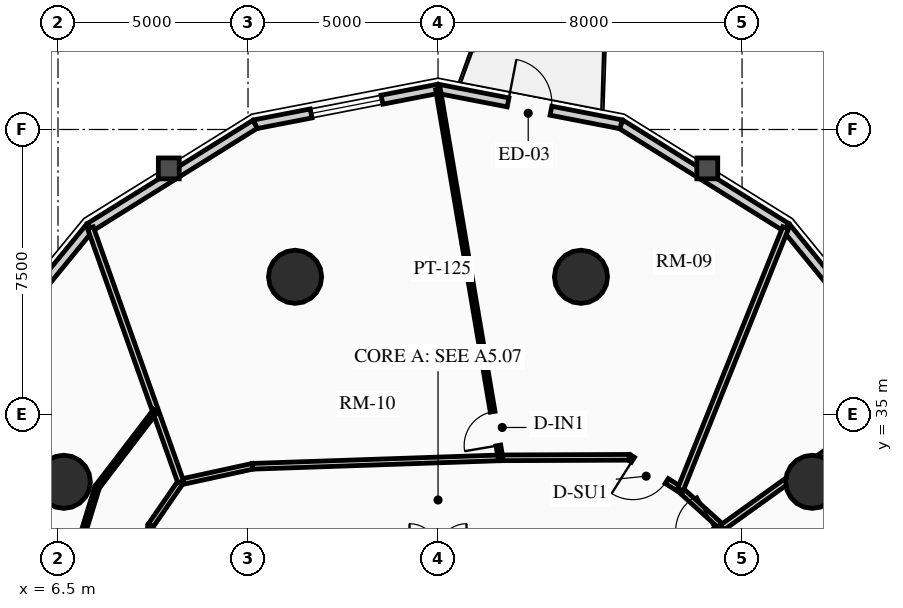
"""IFC4 building model, lengths in metres.
Left out: names, types, materials, properties, quantities, classifications, styles, units other than length and angle.
Written with IfcOpenShell. Run it as: python <this file> out.ifc"""

import sys

from ifc_helpers import new_model, si_unit, direction, frame, frame_2d, origin, origin_2d, place, context, subcontext, project, spatial, rectangle, circle, extrude, source, transform, mapped, element, fill, save


model = new_model("IFC4")
c1 = context("Model", 3, precision=1e-05, world=origin(), true_north=direction((0.0, 1.0)))
c2 = subcontext(c1, "Body", "Model", "MODEL_VIEW")
j1 = project(units=[si_unit("LENGTHUNIT", "METRE"), si_unit("PLANEANGLEUNIT", "RADIAN")], contexts=[c1])
p1 = place(None, origin())
s1 = spatial("IfcSite", under=j1, at=p1, CompositionType="ELEMENT")
p2 = place(p1, origin())
s2 = spatial("IfcBuilding", under=s1, at=p2, CompositionType="ELEMENT")
p3 = place(p2, frame((0.0, 0.0, 113.8)))
s3 = spatial("IfcBuildingStorey", under=s2, at=p3, CompositionType="ELEMENT", Elevation=113.8)
for number, where, z_axis, x_axis in (
    (1, (26.347, 33.229, 0.0), (0.0, 0.0, 1.0), (1.0, 0.0, 0.0)),
    (2, (20.261, 38.623, 0.0), (0.0, 0.0, 1.0), (1.0, 0.0, 0.0)),
    (3, (12.739, 38.623, 0.0), (0.0, 0.0, 1.0), (1.0, 0.0, 0.0)),
    (4, (6.653, 33.229, 0.0), (0.0, 0.0, 1.0), (1.0, 0.0, 0.0)),
):
    element("IfcColumn", number, at=place(p3, frame(where, z_axis=z_axis, x_axis=x_axis)), inside=s3, PredefinedType="USERDEFINED", context=c2, shape_type="SweptSolid", body=[
        extrude(circle(Radius=0.7, at=origin_2d()), origin(), (0.0, 0.0, 1.0), 2.91),
    ])
p4 = place(p3, frame((25.658, 39.928, 0.0), z_axis=(0.0, 0.0, 1.0), x_axis=(0.632700781152, -0.77439635945, 0.0)))
e5 = element("IfcWall", 5, at=p4, inside=s3, PredefinedType="SOLIDWALL", context=c2, shape_type="SweptSolid", body=[
    extrude(rectangle(XDim=5.448, YDim=0.24, at=frame_2d((2.724, 0.0))), origin(), (0.0, 0.0, 1.0), 2.179),
])
m1 = source(origin(), c2, "Body", "SweptSolid", [
    extrude(rectangle(XDim=1.9, YDim=1.35, at=frame_2d((0.95, 0.675))), frame((0.0, 0.13, 0.0), z_axis=(0.0, -1.0, 0.0), x_axis=(1.0, 0.0, 0.0)), (0.0, 0.0, 1.0), 0.26),
])
p5 = place(p4, frame((1.774, 0.0, 0.65)))
e6 = element("IfcOpeningElement", 6, at=p5, cuts=e5, PredefinedType="OPENING", context=c2, shape_type="MappedRepresentation", body=[
    mapped(m1, transform((0.0, 0.0, 0.0), x_axis=(1.0, 0.0, 0.0), y_axis=(0.0, 1.0, 0.0), z_axis=(0.0, 0.0, 1.0), scale=1.0)),
])
p6 = place(p3, frame((21.315, 42.637, 0.0), z_axis=(0.0, 0.0, 1.0), x_axis=(0.848520380187, -0.529162701263, 0.0)))
e7 = element("IfcWall", 7, at=p6, inside=s3, PredefinedType="SOLIDWALL", context=c2, shape_type="SweptSolid", body=[
    extrude(rectangle(XDim=5.119, YDim=0.24, at=frame_2d((2.56, 0.0))), origin(), (0.0, 0.0, 1.0), 2.179),
])
p7 = place(p3, frame((16.5, 43.57, 0.0), z_axis=(0.0, 0.0, 1.0), x_axis=(0.981723785992, -0.190311344954, 0.0)))
e8 = element("IfcWall", 8, at=p7, inside=s3, PredefinedType="SOLIDWALL", context=c2, shape_type="SweptSolid", body=[
    extrude(rectangle(XDim=4.904, YDim=0.24, at=frame_2d((2.452, 0.0))), origin(), (0.0, 0.0, 1.0), 2.179),
])
m2 = source(origin(), c2, "Body", "SweptSolid", [
    extrude(rectangle(XDim=1.15, YDim=2.005, at=frame_2d((0.575, 1.002))), frame((0.0, 0.13, 0.0), z_axis=(0.0, -1.0, 0.0), x_axis=(1.0, 0.0, 0.0)), (0.0, 0.0, 1.0), 0.26),
])
p8 = place(p7, frame((1.877, 0.0, 0.0)))
e9 = element("IfcOpeningElement", 9, at=p8, cuts=e8, PredefinedType="OPENING", context=c2, shape_type="MappedRepresentation", body=[
    mapped(m2, transform((0.0, 0.0, 0.0), x_axis=(1.0, 0.0, 0.0), y_axis=(0.0, 1.0, 0.0), z_axis=(0.0, 0.0, 1.0), scale=1.0)),
])
p9 = place(p3, frame((11.685, 42.637, 0.0), z_axis=(0.0, 0.0, 1.0), x_axis=(0.981723785992, 0.190311344954, 0.0)))
e10 = element("IfcWall", 10, at=p9, inside=s3, PredefinedType="SOLIDWALL", context=c2, shape_type="SweptSolid", body=[
    extrude(rectangle(XDim=4.904, YDim=0.24, at=frame_2d((2.452, 0.0))), origin(), (0.0, 0.0, 1.0), 2.179),
])
p10 = place(p9, frame((1.502, 0.0, 0.65)))
e11 = element("IfcOpeningElement", 11, at=p10, cuts=e10, PredefinedType="OPENING", context=c2, shape_type="MappedRepresentation", body=[
    mapped(m1, transform((0.0, 0.0, 0.0), x_axis=(1.0, 0.0, 0.0), y_axis=(0.0, 1.0, 0.0), z_axis=(0.0, 0.0, 1.0), scale=1.0)),
])
p11 = place(p3, frame((7.342, 39.928, 0.0), z_axis=(0.0, 0.0, 1.0), x_axis=(0.848520380187, 0.529162701263, 0.0)))
e12 = element("IfcWall", 12, at=p11, inside=s3, PredefinedType="SOLIDWALL", context=c2, shape_type="SweptSolid", body=[
    extrude(rectangle(XDim=5.119, YDim=0.24, at=frame_2d((2.56, 0.0))), origin(), (0.0, 0.0, 1.0), 2.179),
])
p12 = place(p3, frame((3.895, 35.709, 0.0), z_axis=(0.0, 0.0, 1.0), x_axis=(0.632700781152, 0.77439635945, 0.0)))
e13 = element("IfcWall", 13, at=p12, inside=s3, PredefinedType="SOLIDWALL", context=c2, shape_type="SweptSolid", body=[
    extrude(rectangle(XDim=5.448, YDim=0.24, at=frame_2d((2.724, 0.0))), origin(), (0.0, 0.0, 1.0), 2.179),
])
p13 = place(p12, frame((1.774, 0.0, 0.65)))
e14 = element("IfcOpeningElement", 14, at=p13, cuts=e13, PredefinedType="OPENING", context=c2, shape_type="MappedRepresentation", body=[
    mapped(m1, transform((0.0, 0.0, 0.0), x_axis=(1.0, 0.0, 0.0), y_axis=(0.0, 1.0, 0.0), z_axis=(0.0, 0.0, 1.0), scale=1.0)),
])
p14 = place(p3, frame((23.98, 32.027, 0.0), z_axis=(0.0, 0.0, 1.0), x_axis=(-0.742353224332, 0.670008724065, 0.0)))
e15 = element("IfcWall", 15, at=p14, inside=s3, PredefinedType="PARTITIONING", context=c2, shape_type="SweptSolid", body=[
    extrude(rectangle(XDim=1.485, YDim=0.15, at=frame_2d((0.742, 0.0))), origin(), (0.0, 0.0, 1.0), 2.225),
])
p15 = place(p3, frame((22.877, 33.022, 0.0), z_axis=(0.0, 0.0, 1.0), x_axis=(-0.845895608855, 0.533348496689, 0.0)))
e16 = element("IfcWall", 16, at=p15, inside=s3, PredefinedType="PARTITIONING", context=c2, shape_type="SweptSolid", body=[
    extrude(rectangle(XDim=1.597, YDim=0.15, at=frame_2d((0.798, 0.0))), origin(), (0.0, 0.0, 1.0), 2.225),
])
m3 = source(origin(), c2, "Body", "SweptSolid", [
    extrude(rectangle(XDim=1.05, YDim=2.015, at=frame_2d((0.525, 1.007))), frame((0.0, 0.085, 0.0), z_axis=(0.0, -1.0, 0.0), x_axis=(1.0, 0.0, 0.0)), (0.0, 0.0, 1.0), 0.17),
])
p16 = place(p15, frame((0.427, 0.0, 0.0)))
e17 = element("IfcOpeningElement", 17, at=p16, cuts=e16, PredefinedType="OPENING", context=c2, shape_type="MappedRepresentation", body=[
    mapped(m3, transform((0.0, 0.0, 0.0), x_axis=(1.0, 0.0, 0.0), y_axis=(0.0, 1.0, 0.0), z_axis=(0.0, 0.0, 1.0), scale=1.0)),
])
p17 = place(p3, frame((21.527, 33.873, 0.0), z_axis=(0.0, 0.0, 1.0), x_axis=(-0.999991838845, -0.004040079574, 0.0)))
e18 = element("IfcWall", 18, at=p17, inside=s3, PredefinedType="PARTITIONING", context=c2, shape_type="SweptSolid", body=[
    extrude(rectangle(XDim=3.384, YDim=0.15, at=frame_2d((1.692, 0.0))), origin(), (0.0, 0.0, 1.0), 2.225),
])
p18 = place(p3, frame((18.143, 33.86, 0.0), z_axis=(0.0, 0.0, 1.0), x_axis=(-0.999419208319, -0.034077060363, 0.0)))
e19 = element("IfcWall", 19, at=p18, inside=s3, PredefinedType="PARTITIONING", context=c2, shape_type="SweptSolid", body=[
    extrude(rectangle(XDim=6.527, YDim=0.15, at=frame_2d((3.263, 0.0))), origin(), (0.0, 0.0, 1.0), 2.225),
])
p19 = place(p3, frame((11.62, 33.637, 0.0), z_axis=(0.0, 0.0, 1.0), x_axis=(-0.97702579435, -0.213121085711, 0.0)))
e20 = element("IfcWall", 20, at=p19, inside=s3, PredefinedType="PARTITIONING", context=c2, shape_type="SweptSolid", body=[
    extrude(rectangle(XDim=1.935, YDim=0.15, at=frame_2d((0.967, 0.0))), origin(), (0.0, 0.0, 1.0), 2.225),
])
p20 = place(p3, frame((9.729, 33.225, 0.0), z_axis=(0.0, 0.0, 1.0), x_axis=(-0.567183649484, -0.82359134755, 0.0)))
e21 = element("IfcWall", 21, at=p20, inside=s3, PredefinedType="PARTITIONING", context=c2, shape_type="SweptSolid", body=[
    extrude(rectangle(XDim=1.392, YDim=0.15, at=frame_2d((0.696, 0.0))), origin(), (0.0, 0.0, 1.0), 2.225),
])
p21 = place(p3, frame((8.94, 32.078, 0.0), z_axis=(0.0, 0.0, 1.0), x_axis=(-0.159148467753, -0.98725466077, 0.0)))
e22 = element("IfcWall", 22, at=p21, inside=s3, PredefinedType="PARTITIONING", context=c2, shape_type="SweptSolid", body=[
    extrude(rectangle(XDim=1.554, YDim=0.15, at=frame_2d((0.777, 0.0))), origin(), (0.0, 0.0, 1.0), 2.225),
])
p22 = place(p3, frame((23.98, 32.027, 0.0), z_axis=(0.0, 0.0, 1.0), x_axis=(0.812162479031, 0.58343132214, 0.0)))
e23 = element("IfcWall", 23, at=p22, inside=s3, PredefinedType="PARTITIONING", context=c2, shape_type="SweptSolid", body=[
    extrude(rectangle(XDim=6.291, YDim=0.16, at=frame_2d((3.146, 0.0))), origin(), (0.0, 0.0, 1.0), 2.179),
])
p23 = place(p3, frame((22.877, 33.022, 0.0), z_axis=(0.0, 0.0, 1.0), x_axis=(0.372898022516, 0.927872332168, 0.0)))
e24 = element("IfcWall", 24, at=p23, inside=s3, PredefinedType="PARTITIONING", context=c2, shape_type="SweptSolid", body=[
    extrude(rectangle(XDim=7.426, YDim=0.16, at=frame_2d((3.713, 0.0))), origin(), (0.0, 0.0, 1.0), 2.179),
])
p24 = place(p3, frame((9.729, 33.225, 0.0), z_axis=(0.0, 0.0, 1.0), x_axis=(-0.334806049563, 0.942287063042, 0.0)))
e25 = element("IfcWall", 25, at=p24, inside=s3, PredefinedType="PARTITIONING", context=c2, shape_type="SweptSolid", body=[
    extrude(rectangle(XDim=7.097, YDim=0.16, at=frame_2d((3.548, 0.0))), origin(), (0.0, 0.0, 1.0), 2.179),
])
p25 = place(p3, frame((22.075, 31.025, 0.0), z_axis=(0.0, 0.0, 1.0), x_axis=(0.885026466958, 0.465540710125, 0.0)))
e26 = element("IfcWall", 26, at=p25, inside=s3, PredefinedType="PARTITIONING", context=c2, shape_type="SweptSolid", body=[
    extrude(rectangle(XDim=2.152, YDim=0.16, at=frame_2d((1.076, 0.0))), origin(), (0.0, 0.0, 1.0), 2.225),
])
m4 = source(origin(), c2, "Body", "SweptSolid", [
    extrude(rectangle(XDim=1.05, YDim=2.015, at=frame_2d((0.525, 1.007))), frame((0.0, 0.09, 0.0), z_axis=(0.0, -1.0, 0.0), x_axis=(1.0, 0.0, 0.0)), (0.0, 0.0, 1.0), 0.18),
])
p26 = place(p25, frame((0.902, 0.0, 0.0)))
e27 = element("IfcOpeningElement", 27, at=p26, cuts=e26, PredefinedType="OPENING", context=c2, shape_type="MappedRepresentation", body=[
    mapped(m4, transform((0.0, 0.0, 0.0), x_axis=(1.0, 0.0, 0.0), y_axis=(0.0, 1.0, 0.0), z_axis=(0.0, 0.0, 1.0), scale=1.0)),
])
p27 = place(p3, frame((18.143, 33.86, 0.0), z_axis=(0.0, 0.0, 1.0), x_axis=(-0.167145472003, 0.985932244725, 0.0)))
e28 = element("IfcWall", 28, at=p27, inside=s3, PredefinedType="PARTITIONING", context=c2, shape_type="SweptSolid", body=[
    extrude(rectangle(XDim=9.829, YDim=0.125, at=frame_2d((4.914, 0.0))), origin(), (0.0, 0.0, 1.0), 2.179),
])
m5 = source(origin(), c2, "Body", "SweptSolid", [
    extrude(rectangle(XDim=0.9, YDim=2.005, at=frame_2d((0.45, 1.002))), frame((0.0, 0.073, 0.0), z_axis=(0.0, -1.0, 0.0), x_axis=(1.0, 0.0, 0.0)), (0.0, 0.0, 1.0), 0.145),
])
p28 = place(p27, frame((0.33, 0.0, 0.0)))
e29 = element("IfcOpeningElement", 29, at=p28, cuts=e28, PredefinedType="OPENING", context=c2, shape_type="MappedRepresentation", body=[
    mapped(m5, transform((0.0, 0.0, 0.0), x_axis=(1.0, 0.0, 0.0), y_axis=(0.0, 1.0, 0.0), z_axis=(0.0, 0.0, 1.0), scale=1.0)),
])
p29 = place(p3, frame((9.064, 35.097, 0.0), z_axis=(0.0, 0.0, 1.0), x_axis=(-0.607126893664, -0.794604892377, 0.0)))
e30 = element("IfcWall", 30, at=p29, inside=s3, PredefinedType="PARTITIONING", context=c2, shape_type="SweptSolid", body=[
    extrude(rectangle(XDim=2.524, YDim=0.125, at=frame_2d((1.262, 0.0))), origin(), (0.0, 0.0, 1.0), 2.179),
])
p30 = place(p3, frame((7.532, 33.092, 0.0), z_axis=(0.0, 0.0, 1.0), x_axis=(-0.293965637063, -0.955815988685, 0.0)))
e31 = element("IfcWall", 31, at=p30, inside=s3, PredefinedType="PARTITIONING", context=c2, shape_type="SweptSolid", body=[
    extrude(rectangle(XDim=2.712, YDim=0.125, at=frame_2d((1.356, 0.0))), origin(), (0.0, 0.0, 1.0), 2.225),
])
m6 = source(origin(), c2, "Body", "SweptSolid", [
    extrude(rectangle(XDim=1.15, YDim=2.005, at=frame_2d((0.575, 1.002))), frame((0.0, 0.025, 0.0), z_axis=(0.0, -1.0, 0.0), x_axis=(1.0, 0.0, 0.0)), (0.0, 0.0, 1.0), 0.05),
])
p31 = place(p8, origin())
e32 = element("IfcDoor", 32, at=p31, inside=s3, OperationType="SINGLE_SWING_LEFT", PredefinedType="DOOR", context=c2, shape_type="MappedRepresentation", body=[
    mapped(m6, transform((0.0, 0.0, 0.0), x_axis=(1.0, 0.0, 0.0), y_axis=(0.0, 1.0, 0.0), z_axis=(0.0, 0.0, 1.0), scale=1.0)),
])
fill(e9, e32)
m7 = source(origin(), c2, "Body", "SweptSolid", [
    extrude(rectangle(XDim=1.9, YDim=1.35, at=frame_2d((0.95, 0.675))), frame((0.0, 0.03, 0.0), z_axis=(0.0, -1.0, 0.0), x_axis=(1.0, 0.0, 0.0)), (0.0, 0.0, 1.0), 0.06),
])
p32 = place(p10, origin())
e33 = element("IfcWindow", 33, at=p32, inside=s3, PartitioningType="DOUBLE_PANEL_VERTICAL", PredefinedType="WINDOW", context=c2, shape_type="MappedRepresentation", body=[
    mapped(m7, transform((0.0, 0.0, 0.0), x_axis=(1.0, 0.0, 0.0), y_axis=(0.0, 1.0, 0.0), z_axis=(0.0, 0.0, 1.0), scale=1.0)),
])
fill(e11, e33)
m8 = source(origin(), c2, "Body", "SweptSolid", [
    extrude(rectangle(XDim=1.05, YDim=2.015, at=frame_2d((0.525, 1.007))), frame((0.0, 0.025, 0.0), z_axis=(0.0, -1.0, 0.0), x_axis=(1.0, 0.0, 0.0)), (0.0, 0.0, 1.0), 0.05),
])
p33 = place(p16, origin())
e34 = element("IfcDoor", 34, at=p33, inside=s3, OperationType="SINGLE_SWING_RIGHT", PredefinedType="DOOR", context=c2, shape_type="MappedRepresentation", body=[
    mapped(m8, transform((0.0, 0.0, 0.0), x_axis=(1.0, 0.0, 0.0), y_axis=(0.0, 1.0, 0.0), z_axis=(0.0, 0.0, 1.0), scale=1.0)),
])
fill(e17, e34)
m9 = source(origin(), c2, "Body", "SweptSolid", [
    extrude(rectangle(XDim=0.9, YDim=2.005, at=frame_2d((0.45, 1.002))), frame((0.0, 0.025, 0.0), z_axis=(0.0, -1.0, 0.0), x_axis=(1.0, 0.0, 0.0)), (0.0, 0.0, 1.0), 0.05),
])
p34 = place(p28, origin())
e35 = element("IfcDoor", 35, at=p34, inside=s3, OperationType="SINGLE_SWING_LEFT", PredefinedType="DOOR", context=c2, shape_type="MappedRepresentation", body=[
    mapped(m9, transform((0.0, 0.0, 0.0), x_axis=(1.0, 0.0, 0.0), y_axis=(0.0, 1.0, 0.0), z_axis=(0.0, 0.0, 1.0), scale=1.0)),
])
fill(e29, e35)
save(model, sys.argv[1])
